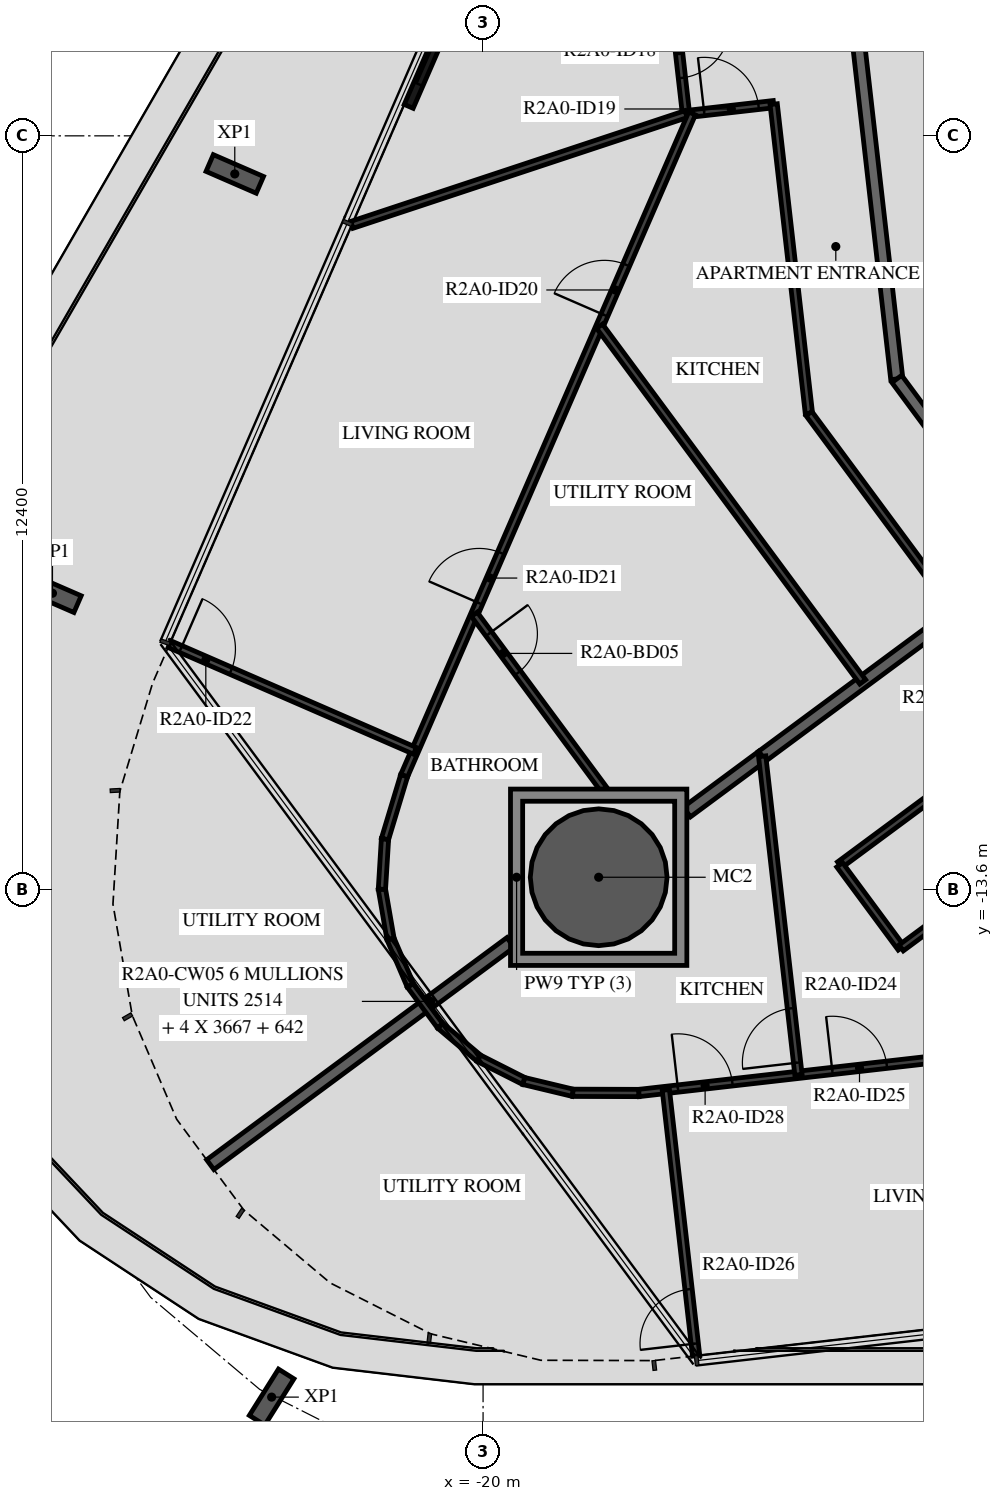
"""IFC4 building model, lengths in metres.
Left out: names, types, materials, properties, quantities, classifications, styles, units other than length and angle.
Written with IfcOpenShell. Run it as: python <this file> out.ifc"""

import sys

from ifc_helpers import new_model, si_unit, direction, frame, frame_2d, origin, origin_2d, place, context, subcontext, project, spatial, polyline, rectangle, hollow_circle, i_section, outline, extrude, element, fill, save


model = new_model("IFC4")
c1 = context("Model", 3, precision=1e-05, world=origin(), true_north=direction((0.0, 1.0)))
c2 = subcontext(c1, "Body", "Model", "MODEL_VIEW")
j1 = project(units=[si_unit("LENGTHUNIT", "METRE"), si_unit("PLANEANGLEUNIT", "RADIAN")], contexts=[c1])
p1 = place(None, origin())
s1 = spatial("IfcSite", under=j1, at=p1, CompositionType="ELEMENT")
p2 = place(p1, origin())
s2 = spatial("IfcBuilding", under=s1, at=p2, CompositionType="ELEMENT")
p3 = place(p2, frame((0.0, 0.0, 76.7)))
s3 = spatial("IfcBuildingStorey", under=s2, at=p3, CompositionType="ELEMENT", Elevation=76.7)
p4 = place(p3, frame((-18.099, -13.393, -0.45), z_axis=(0.0, 0.0, 1.0), x_axis=(1.0, 0.0, 0.0)))
e1 = element("IfcColumn", 1, at=p4, inside=s3, PredefinedType="COLUMN", context=c2, shape_type="SweptSolid", body=[
    extrude(hollow_circle(Radius=1.125, WallThickness=0.055, at=origin_2d()), origin(), (0.0, 0.0, 1.0), 3.57),
])
for number, where, z_axis, x_axis in (
    (2, (-24.083, -1.826, -0.45), (0.0, 0.0, 1.0), (0.399, 0.917, 0.0)),
    (3, (-27.081, -8.722, -0.45), (0.0, 0.0, 1.0), (0.399, 0.917, 0.0)),
    (4, (-23.477, -21.941, -0.45), (0.0, 0.0, 1.0), (-0.846, 0.532, 0.0)),
):
    element("IfcColumn", number, at=place(p3, frame(where, z_axis=z_axis, x_axis=x_axis)), inside=s3, PredefinedType="COLUMN", context=c2, shape_type="SweptSolid", body=[
        extrude(i_section(OverallWidth=0.3, OverallDepth=0.9, WebThickness=0.019, FlangeThickness=0.035, FilletRadius=0.03, at=origin_2d()), origin(), (0.0, 0.0, 1.0), 3.57),
    ])
p5 = place(p3, frame((-19.947, 2.219, 0.0), z_axis=(0.0, 0.0, 1.0), x_axis=(-0.398784695066, -0.917044582876, 0.0)))
e5 = element("IfcWall", 5, at=p5, inside=s3, PredefinedType="STANDARD", context=c2, shape_type="SweptSolid", body=[
    extrude(rectangle(XDim=3.2, YDim=0.16, at=frame_2d((1.6, 0.0))), origin(), (0.0, 0.0, 1.0), 3.12),
])
p6 = place(p5, frame((0.4, 0.0, 0.0)))
e6 = element("IfcOpeningElement", 6, at=p6, cuts=e5, PredefinedType="OPENING", context=c2, shape_type="SweptSolid", body=[
    extrude(rectangle(XDim=2.4, YDim=2.4, at=frame_2d((1.2, 1.2))), frame((0.0, 0.09, 0.0), z_axis=(0.0, -1.0, 0.0), x_axis=(1.0, 0.0, 0.0)), (0.0, 0.0, 1.0), 0.18),
])
p7 = place(p3, frame((-14.013, 1.974, 0.0), z_axis=(0.0, 0.0, 1.0), x_axis=(0.113196526349, -0.993572617589, 0.0)))
e7 = element("IfcWall", 7, at=p7, inside=s3, PredefinedType="STANDARD", context=c2, shape_type="SweptSolid", body=[
    extrude(rectangle(XDim=7.219, YDim=0.2, at=frame_2d((3.609, 0.0))), origin(), (0.0, 0.0, 1.0), 3.12),
])
p8 = place(p7, frame((0.2, 0.0, 0.0)))
e8 = element("IfcOpeningElement", 8, at=p8, cuts=e7, PredefinedType="OPENING", context=c2, shape_type="SweptSolid", body=[
    extrude(rectangle(XDim=1.0, YDim=2.1, at=frame_2d((0.5, 1.05))), frame((0.0, 0.11, 0.0), z_axis=(0.0, -1.0, 0.0), x_axis=(1.0, 0.0, 0.0)), (0.0, 0.0, 1.0), 0.22),
])
p9 = place(p3, frame((-13.196, -5.198, 0.0), z_axis=(0.0, 0.0, 1.0), x_axis=(0.594805187394, -0.803869883159, 0.0)))
e9 = element("IfcWall", 9, at=p9, inside=s3, PredefinedType="STANDARD", context=c2, shape_type="SweptSolid", body=[
    extrude(rectangle(XDim=7.342, YDim=0.2, at=frame_2d((3.671, 0.0))), origin(), (0.0, 0.0, 1.0), 3.12),
])
p10 = place(p3, frame((-15.41, -11.403, 0.0), z_axis=(0.0, 0.0, 1.0), x_axis=(0.803887568227, 0.594781285558, 0.0)))
e10 = element("IfcWall", 10, at=p10, inside=s3, PredefinedType="STANDARD", context=c2, shape_type="SweptSolid", body=[
    extrude(rectangle(XDim=5.47, YDim=0.2, at=frame_2d((2.735, 0.0))), origin(), (0.0, 0.0, 1.0), 3.12),
])
p11 = place(p3, frame((-16.649, -12.32, 0.0), z_axis=(0.0, 0.0, 1.0), x_axis=(0.803804030903, 0.594894175383, 0.0)))
e11 = element("IfcWall", 11, at=p11, inside=s3, PredefinedType="STANDARD", context=c2, shape_type="SweptSolid", body=[
    extrude(rectangle(XDim=1.542, YDim=0.2, at=frame_2d((0.771, 0.0))), origin(), (0.0, 0.0, 1.0), 3.12),
])
p12 = place(p3, frame((-24.486, -18.119, 0.0), z_axis=(0.0, 0.0, 1.0), x_axis=(0.80384227933, 0.594842491726, 0.0)))
e12 = element("IfcWall", 12, at=p12, inside=s3, PredefinedType="STANDARD", context=c2, shape_type="SweptSolid", body=[
    extrude(rectangle(XDim=6.142, YDim=0.2, at=frame_2d((3.071, 0.0))), origin(), (0.0, 0.0, 1.0), 3.12),
])
p13 = place(p3, frame((-16.854, 0.846, 0.0), z_axis=(0.0, 0.0, 1.0), x_axis=(0.113173930474, -0.993575191649, 0.0)))
e13 = element("IfcWall", 13, at=p13, inside=s3, PredefinedType="PARTITIONING", context=c2, shape_type="SweptSolid", body=[
    extrude(rectangle(XDim=1.7, YDim=0.12, at=frame_2d((0.85, 0.0))), origin(), (0.0, 0.0, 1.0), 3.12),
])
p14 = place(p13, frame((0.2, 0.0, 0.0)))
e14 = element("IfcOpeningElement", 14, at=p14, cuts=e13, PredefinedType="OPENING", context=c2, shape_type="SweptSolid", body=[
    extrude(rectangle(XDim=0.9, YDim=2.1, at=frame_2d((0.45, 1.05))), frame((0.0, 0.07, 0.0), z_axis=(0.0, -1.0, 0.0), x_axis=(1.0, 0.0, 0.0)), (0.0, 0.0, 1.0), 0.14),
])
p15 = place(p3, frame((-16.563, -0.832, 0.0), z_axis=(0.0, 0.0, 1.0), x_axis=(0.993578035261, 0.113148963084, 0.0)))
e15 = element("IfcWall", 15, at=p15, inside=s3, PredefinedType="PARTITIONING", context=c2, shape_type="SweptSolid", body=[
    extrude(rectangle(XDim=1.351, YDim=0.12, at=frame_2d((0.675, 0.0))), origin(), (0.0, 0.0, 1.0), 3.12),
])
p16 = place(p15, frame((0.2, 0.0, 0.0)))
e16 = element("IfcOpeningElement", 16, at=p16, cuts=e15, PredefinedType="OPENING", context=c2, shape_type="SweptSolid", body=[
    extrude(rectangle(XDim=0.9, YDim=2.1, at=frame_2d((0.45, 1.05))), frame((0.0, 0.07, 0.0), z_axis=(0.0, -1.0, 0.0), x_axis=(1.0, 0.0, 0.0)), (0.0, 0.0, 1.0), 0.14),
])
p17 = place(p3, frame((-15.221, -0.679, 0.0), z_axis=(0.0, 0.0, 1.0), x_axis=(0.113219875647, -0.993569957154, 0.0)))
e17 = element("IfcWall", 17, at=p17, inside=s3, PredefinedType="PARTITIONING", context=c2, shape_type="SweptSolid", body=[
    extrude(rectangle(XDim=5.121, YDim=0.12, at=frame_2d((2.561, 0.0))), origin(), (0.0, 0.0, 1.0), 3.12),
])
p18 = place(p3, frame((-14.641, -5.767, 0.0), z_axis=(0.0, 0.0, 1.0), x_axis=(0.594825885962, -0.803854567313, 0.0)))
e18 = element("IfcWall", 18, at=p18, inside=s3, PredefinedType="PARTITIONING", context=c2, shape_type="SweptSolid", body=[
    extrude(rectangle(XDim=6.266, YDim=0.12, at=frame_2d((3.133, 0.0))), origin(), (0.0, 0.0, 1.0), 3.12),
])
p19 = place(p18, frame((4.273, 0.0, 0.0)))
e19 = element("IfcOpeningElement", 19, at=p19, cuts=e18, PredefinedType="OPENING", context=c2, shape_type="SweptSolid", body=[
    extrude(rectangle(XDim=0.9, YDim=2.1, at=frame_2d((0.45, 1.05))), frame((0.0, 0.07, 0.0), z_axis=(0.0, -1.0, 0.0), x_axis=(1.0, 0.0, 0.0)), (0.0, 0.0, 1.0), 0.14),
])
p20 = place(p3, frame((-22.157, -2.664, 0.0), z_axis=(0.0, 0.0, 1.0), x_axis=(0.949263673698, 0.314481283698, 0.0)))
e20 = element("IfcWall", 20, at=p20, inside=s3, PredefinedType="PARTITIONING", context=c2, shape_type="SweptSolid", body=[
    extrude(rectangle(XDim=5.789, YDim=0.12, at=frame_2d((2.895, 0.0))), origin(), (0.0, 0.0, 1.0), 3.12),
])
p21 = place(p3, frame((-21.298, -11.722, 0.0), z_axis=(0.0, 0.0, 1.0), x_axis=(0.398737387658, 0.917065153456, 0.0)))
e21 = element("IfcWall", 21, at=p21, inside=s3, PredefinedType="PARTITIONING", context=c2, shape_type="SweptSolid", body=[
    extrude(rectangle(XDim=11.875, YDim=0.12, at=frame_2d((5.938, 0.0))), origin(), (0.0, 0.0, 1.0), 3.12),
])
p22 = place(p21, frame((8.26, 0.0, 0.0)))
e22 = element("IfcOpeningElement", 22, at=p22, cuts=e21, PredefinedType="OPENING", context=c2, shape_type="SweptSolid", body=[
    extrude(rectangle(XDim=0.9, YDim=2.1, at=frame_2d((0.45, 1.05))), frame((0.0, 0.07, 0.0), z_axis=(0.0, -1.0, 0.0), x_axis=(1.0, 0.0, 0.0)), (0.0, 0.0, 1.0), 0.14),
])
p23 = place(p21, frame((3.094, 0.0, 0.0)))
e23 = element("IfcOpeningElement", 23, at=p23, cuts=e21, PredefinedType="OPENING", context=c2, shape_type="SweptSolid", body=[
    extrude(rectangle(XDim=0.9, YDim=2.1, at=frame_2d((0.45, 1.05))), frame((0.0, 0.07, 0.0), z_axis=(0.0, -1.0, 0.0), x_axis=(1.0, 0.0, 0.0)), (0.0, 0.0, 1.0), 0.14),
])
p24 = place(p3, frame((-25.156, -9.559, 0.0), z_axis=(0.0, 0.0, 1.0), x_axis=(0.917042707292, -0.398789008127, 0.0)))
e24 = element("IfcWall", 24, at=p24, inside=s3, PredefinedType="PARTITIONING", context=c2, shape_type="SweptSolid", body=[
    extrude(rectangle(XDim=4.4, YDim=0.12, at=frame_2d((2.2, 0.0))), origin(), (0.0, 0.0, 1.0), 2.73),
])
p25 = place(p24, frame((0.2, 0.0, 0.0)))
e25 = element("IfcOpeningElement", 25, at=p25, cuts=e24, PredefinedType="OPENING", context=c2, shape_type="SweptSolid", body=[
    extrude(rectangle(XDim=0.9, YDim=2.1, at=frame_2d((0.45, 1.05))), frame((0.0, 0.07, 0.0), z_axis=(0.0, -1.0, 0.0), x_axis=(1.0, 0.0, 0.0)), (0.0, 0.0, 1.0), 0.14),
])
p26 = place(p3, frame((-18.084, -4.331, 0.0), z_axis=(0.0, 0.0, 1.0), x_axis=(0.594811782108, -0.803865003508, 0.0)))
e26 = element("IfcWall", 26, at=p26, inside=s3, PredefinedType="PARTITIONING", context=c2, shape_type="SweptSolid", body=[
    extrude(rectangle(XDim=7.276, YDim=0.12, at=frame_2d((3.638, 0.0))), origin(), (0.0, 0.0, 1.0), 3.12),
])
p27 = place(p3, frame((-20.144, -9.068, 0.0), z_axis=(0.0, 0.0, 1.0), x_axis=(0.59487477233, -0.803818390711, 0.0)))
e27 = element("IfcWall", 27, at=p27, inside=s3, PredefinedType="PARTITIONING", context=c2, shape_type="SweptSolid", body=[
    extrude(rectangle(XDim=3.575, YDim=0.12, at=frame_2d((1.788, 0.0))), origin(), (0.0, 0.0, 1.0), 3.12),
])
p28 = place(p27, frame((0.4, 0.0, 0.0)))
e28 = element("IfcOpeningElement", 28, at=p28, cuts=e27, PredefinedType="OPENING", context=c2, shape_type="SweptSolid", body=[
    extrude(rectangle(XDim=0.8, YDim=2.1, at=frame_2d((0.4, 1.05))), frame((0.0, 0.07, 0.0), z_axis=(0.0, -1.0, 0.0), x_axis=(1.0, 0.0, 0.0)), (0.0, 0.0, 1.0), 0.14),
])
for number, where, z_axis, x_axis in (
    (29, (-20.703, -15.835, 0.0), (0.0, 0.0, 1.0), (-0.595, 0.804, 0.0)),
    (30, (-21.196, -15.168, 0.0), (0.0, 0.0, 1.0), (-0.394, 0.919, 0.0)),
):
    element("IfcWall", number, at=place(p3, frame(where, z_axis=z_axis, x_axis=x_axis)), inside=s3, PredefinedType="PARTITIONING", context=c2, shape_type="SweptSolid", body=[
        extrude(rectangle(XDim=0.829, YDim=0.12, at=frame_2d((0.415, 0.0))), origin(), (0.0, 0.0, 1.0), 3.12),
    ])
p29 = place(p3, frame((-21.522, -14.406, 0.0), z_axis=(0.0, 0.0, 1.0), x_axis=(-0.170794347099, 0.985306698952, 0.0)))
e31 = element("IfcWall", 31, at=p29, inside=s3, PredefinedType="PARTITIONING", context=c2, shape_type="SweptSolid", body=[
    extrude(rectangle(XDim=0.829, YDim=0.12, at=frame_2d((0.415, 0.0))), origin(), (0.0, 0.0, 1.0), 3.12),
])
p30 = place(p3, frame((-21.664, -13.59, 0.0), z_axis=(0.0, 0.0, 1.0), x_axis=(0.061277779288, 0.998120751095, 0.0)))
e32 = element("IfcWall", 32, at=p30, inside=s3, PredefinedType="PARTITIONING", context=c2, shape_type="SweptSolid", body=[
    extrude(rectangle(XDim=0.829, YDim=0.12, at=frame_2d((0.414, 0.0))), origin(), (0.0, 0.0, 1.0), 3.12),
])
p31 = place(p3, frame((-21.613, -12.762, 0.0), z_axis=(0.0, 0.0, 1.0), x_axis=(0.289552239308, 0.95716221233, 0.0)))
e33 = element("IfcWall", 33, at=p31, inside=s3, PredefinedType="PARTITIONING", context=c2, shape_type="SweptSolid", body=[
    extrude(rectangle(XDim=1.087, YDim=0.12, at=frame_2d((0.543, 0.0))), origin(), (0.0, 0.0, 1.0), 3.12),
])
p32 = place(p3, frame((-10.914, -10.804, 0.0), z_axis=(0.0, 0.0, 1.0), x_axis=(-0.803864616889, -0.594812304609, 0.0)))
e34 = element("IfcWall", 34, at=p32, inside=s3, PredefinedType="PARTITIONING", context=c2, shape_type="SweptSolid", body=[
    extrude(rectangle(XDim=4.008, YDim=0.12, at=frame_2d((2.004, 0.0))), origin(), (0.0, 0.0, 1.0), 3.12),
])
p33 = place(p3, frame((-14.136, -13.188, 0.0), z_axis=(0.0, 0.0, 1.0), x_axis=(0.594863421241, -0.803826791087, 0.0)))
e35 = element("IfcWall", 35, at=p33, inside=s3, PredefinedType="PARTITIONING", context=c2, shape_type="SweptSolid", body=[
    extrude(rectangle(XDim=1.7, YDim=0.12, at=frame_2d((0.85, 0.0))), origin(), (0.0, 0.0, 1.0), 3.12),
])
p34 = place(p3, frame((-13.125, -14.555, 0.0), z_axis=(0.0, 0.0, 1.0), x_axis=(0.80389374229, 0.594772940799, 0.0)))
e36 = element("IfcWall", 36, at=p34, inside=s3, PredefinedType="PARTITIONING", context=c2, shape_type="SweptSolid", body=[
    extrude(rectangle(XDim=4.008, YDim=0.12, at=frame_2d((2.004, 0.0))), origin(), (0.0, 0.0, 1.0), 3.12),
])
for number, where, z_axis, x_axis in (
    (37, (-20.703, -15.835, 0.0), (0.0, 0.0, 1.0), (0.764, -0.645, 0.0)),
    (38, (-20.069, -16.369, 0.0), (0.0, 0.0, 1.0), (0.892, -0.451, 0.0)),
):
    element("IfcWall", number, at=place(p3, frame(where, z_axis=z_axis, x_axis=x_axis)), inside=s3, PredefinedType="PARTITIONING", context=c2, shape_type="SweptSolid", body=[
        extrude(rectangle(XDim=0.829, YDim=0.12, at=frame_2d((0.415, 0.0))), origin(), (0.0, 0.0, 1.0), 3.12),
    ])
p35 = place(p3, frame((-19.33, -16.744, 0.0), z_axis=(0.0, 0.0, 1.0), x_axis=(0.972403343288, -0.23330610357, 0.0)))
e39 = element("IfcWall", 39, at=p35, inside=s3, PredefinedType="PARTITIONING", context=c2, shape_type="SweptSolid", body=[
    extrude(rectangle(XDim=0.829, YDim=0.12, at=frame_2d((0.415, 0.0))), origin(), (0.0, 0.0, 1.0), 3.12),
])
p36 = place(p3, frame((-18.524, -16.937, 0.0), z_axis=(0.0, 0.0, 1.0), x_axis=(0.999995736722, -0.00292002349, 0.0)))
e40 = element("IfcWall", 40, at=p36, inside=s3, PredefinedType="PARTITIONING", context=c2, shape_type="SweptSolid", body=[
    extrude(rectangle(XDim=1.087, YDim=0.12, at=frame_2d((0.543, 0.0))), origin(), (0.0, 0.0, 1.0), 3.12),
])
p37 = place(p3, frame((-17.437, -16.94, 0.0), z_axis=(0.0, 0.0, 1.0), x_axis=(0.993573314119, 0.113190412448, 0.0)))
e41 = element("IfcWall", 41, at=p37, inside=s3, PredefinedType="PARTITIONING", context=c2, shape_type="SweptSolid", body=[
    extrude(rectangle(XDim=14.576, YDim=0.12, at=frame_2d((7.288, 0.0))), origin(), (0.0, 0.0, 1.0), 3.12),
])
p38 = place(p37, frame((3.201, 0.0, 0.0)))
e42 = element("IfcOpeningElement", 42, at=p38, cuts=e41, PredefinedType="OPENING", context=c2, shape_type="SweptSolid", body=[
    extrude(rectangle(XDim=0.9, YDim=2.1, at=frame_2d((0.45, 1.05))), frame((0.0, 0.07, 0.0), z_axis=(0.0, -1.0, 0.0), x_axis=(1.0, 0.0, 0.0)), (0.0, 0.0, 1.0), 0.14),
])
p39 = place(p37, frame((0.645, 0.0, 0.0)))
e43 = element("IfcOpeningElement", 43, at=p39, cuts=e41, PredefinedType="OPENING", context=c2, shape_type="SweptSolid", body=[
    extrude(rectangle(XDim=0.9, YDim=2.1, at=frame_2d((0.45, 1.05))), frame((0.0, 0.07, 0.0), z_axis=(0.0, -1.0, 0.0), x_axis=(1.0, 0.0, 0.0)), (0.0, 0.0, 1.0), 0.14),
])
p40 = place(p3, frame((-14.813, -16.641, 0.0), z_axis=(0.0, 0.0, 1.0), x_axis=(-0.113210971478, 0.993570971767, 0.0)))
e44 = element("IfcWall", 44, at=p40, inside=s3, PredefinedType="PARTITIONING", context=c2, shape_type="SweptSolid", body=[
    extrude(rectangle(XDim=5.273, YDim=0.12, at=frame_2d((2.636, 0.0))), origin(), (0.0, 0.0, 1.0), 3.12),
])
p41 = place(p40, frame((0.2, 0.0, 0.0)))
e45 = element("IfcOpeningElement", 45, at=p41, cuts=e44, PredefinedType="OPENING", context=c2, shape_type="SweptSolid", body=[
    extrude(rectangle(XDim=0.9, YDim=2.1, at=frame_2d((0.45, 1.05))), frame((0.0, 0.07, 0.0), z_axis=(0.0, -1.0, 0.0), x_axis=(1.0, 0.0, 0.0)), (0.0, 0.0, 1.0), 0.14),
])
p42 = place(p3, frame((-16.496, -21.262, 0.0), z_axis=(0.0, 0.0, 1.0), x_axis=(-0.1132445713, 0.993567142709, 0.0)))
e46 = element("IfcWall", 46, at=p42, inside=s3, PredefinedType="PARTITIONING", context=c2, shape_type="SweptSolid", body=[
    extrude(rectangle(XDim=4.4, YDim=0.12, at=frame_2d((2.2, 0.0))), origin(), (0.0, 0.0, 1.0), 2.73),
])
p43 = place(p42, frame((0.2, 0.0, 0.0)))
e47 = element("IfcOpeningElement", 47, at=p43, cuts=e46, PredefinedType="OPENING", context=c2, shape_type="SweptSolid", body=[
    extrude(rectangle(XDim=0.9, YDim=2.1, at=frame_2d((0.45, 1.05))), frame((0.0, 0.07, 0.0), z_axis=(0.0, -1.0, 0.0), x_axis=(1.0, 0.0, 0.0)), (0.0, 0.0, 1.0), 0.14),
])
p44 = place(p3, origin())
e48 = element("IfcWall", 48, at=p44, inside=s3, PredefinedType="STANDARD", context=c2, shape_type="SweptSolid", body=[
    extrude(outline(polyline([(-16.649, -11.942), (-16.649, -14.843), (-19.549, -14.843), (-19.549, -11.942), (-16.649, -11.942)]), holes=[polyline([(-19.349, -14.643), (-16.849, -14.643), (-16.849, -12.143), (-19.349, -12.143), (-19.349, -14.643)])]), origin(), (0.0, 0.0, 1.0), 3.12),
])
p45 = place(p6, origin())
e49 = element("IfcDoor", 49, at=p45, inside=s3, OperationType="DOUBLE_DOOR_SLIDING", PredefinedType="DOOR", context=c2, shape_type="SweptSolid", body=[
    extrude(rectangle(XDim=2.4, YDim=2.4, at=frame_2d((1.2, 1.2))), frame((0.0, 0.025, 0.0), z_axis=(0.0, -1.0, 0.0), x_axis=(1.0, 0.0, 0.0)), (0.0, 0.0, 1.0), 0.05),
])
fill(e6, e49)
p46 = place(p14, origin())
e50 = element("IfcDoor", 50, at=p46, inside=s3, OperationType="SINGLE_SWING_RIGHT", PredefinedType="DOOR", context=c2, shape_type="SweptSolid", body=[
    extrude(rectangle(XDim=0.9, YDim=2.1, at=frame_2d((0.45, 1.05))), frame((0.0, 0.025, 0.0), z_axis=(0.0, -1.0, 0.0), x_axis=(1.0, 0.0, 0.0)), (0.0, 0.0, 1.0), 0.05),
])
fill(e14, e50)
p47 = place(p16, origin())
e51 = element("IfcDoor", 51, at=p47, inside=s3, OperationType="SINGLE_SWING_LEFT", PredefinedType="DOOR", context=c2, shape_type="SweptSolid", body=[
    extrude(rectangle(XDim=0.9, YDim=2.1, at=frame_2d((0.45, 1.05))), frame((0.0, 0.025, 0.0), z_axis=(0.0, -1.0, 0.0), x_axis=(1.0, 0.0, 0.0)), (0.0, 0.0, 1.0), 0.05),
])
fill(e16, e51)
p48 = place(p22, origin())
e52 = element("IfcDoor", 52, at=p48, inside=s3, OperationType="SINGLE_SWING_RIGHT", PredefinedType="DOOR", context=c2, shape_type="SweptSolid", body=[
    extrude(rectangle(XDim=0.9, YDim=2.1, at=frame_2d((0.45, 1.05))), frame((0.0, 0.025, 0.0), z_axis=(0.0, -1.0, 0.0), x_axis=(1.0, 0.0, 0.0)), (0.0, 0.0, 1.0), 0.05),
])
fill(e22, e52)
p49 = place(p23, origin())
e53 = element("IfcDoor", 53, at=p49, inside=s3, OperationType="SINGLE_SWING_LEFT", PredefinedType="DOOR", context=c2, shape_type="SweptSolid", body=[
    extrude(rectangle(XDim=0.9, YDim=2.1, at=frame_2d((0.45, 1.05))), frame((0.0, 0.025, 0.0), z_axis=(0.0, -1.0, 0.0), x_axis=(1.0, 0.0, 0.0)), (0.0, 0.0, 1.0), 0.05),
])
fill(e23, e53)
p50 = place(p28, origin())
e54 = element("IfcDoor", 54, at=p50, inside=s3, OperationType="SINGLE_SWING_RIGHT", PredefinedType="DOOR", context=c2, shape_type="SweptSolid", body=[
    extrude(rectangle(XDim=0.8, YDim=2.1, at=frame_2d((0.4, 1.05))), frame((0.0, 0.025, 0.0), z_axis=(0.0, -1.0, 0.0), x_axis=(1.0, 0.0, 0.0)), (0.0, 0.0, 1.0), 0.05),
])
fill(e28, e54)
p51 = place(p25, origin())
e55 = element("IfcDoor", 55, at=p51, inside=s3, OperationType="SINGLE_SWING_RIGHT", PredefinedType="DOOR", context=c2, shape_type="SweptSolid", body=[
    extrude(rectangle(XDim=0.9, YDim=2.1, at=frame_2d((0.45, 1.05))), frame((0.0, 0.025, 0.0), z_axis=(0.0, -1.0, 0.0), x_axis=(1.0, 0.0, 0.0)), (0.0, 0.0, 1.0), 0.05),
])
fill(e25, e55)
p52 = place(p41, origin())
e56 = element("IfcDoor", 56, at=p52, inside=s3, OperationType="SINGLE_SWING_LEFT", PredefinedType="DOOR", context=c2, shape_type="SweptSolid", body=[
    extrude(rectangle(XDim=0.9, YDim=2.1, at=frame_2d((0.45, 1.05))), frame((0.0, 0.025, 0.0), z_axis=(0.0, -1.0, 0.0), x_axis=(1.0, 0.0, 0.0)), (0.0, 0.0, 1.0), 0.05),
])
fill(e45, e56)
p53 = place(p38, origin())
e57 = element("IfcDoor", 57, at=p53, inside=s3, OperationType="SINGLE_SWING_LEFT", PredefinedType="DOOR", context=c2, shape_type="SweptSolid", body=[
    extrude(rectangle(XDim=0.9, YDim=2.1, at=frame_2d((0.45, 1.05))), frame((0.0, 0.025, 0.0), z_axis=(0.0, -1.0, 0.0), x_axis=(1.0, 0.0, 0.0)), (0.0, 0.0, 1.0), 0.05),
])
fill(e42, e57)
p54 = place(p43, origin())
e58 = element("IfcDoor", 58, at=p54, inside=s3, OperationType="SINGLE_SWING_LEFT", PredefinedType="DOOR", context=c2, shape_type="SweptSolid", body=[
    extrude(rectangle(XDim=0.9, YDim=2.1, at=frame_2d((0.45, 1.05))), frame((0.0, 0.025, 0.0), z_axis=(0.0, -1.0, 0.0), x_axis=(1.0, 0.0, 0.0)), (0.0, 0.0, 1.0), 0.05),
])
fill(e47, e58)
p55 = place(p39, origin())
e59 = element("IfcDoor", 59, at=p55, inside=s3, OperationType="SINGLE_SWING_RIGHT", PredefinedType="DOOR", context=c2, shape_type="SweptSolid", body=[
    extrude(rectangle(XDim=0.9, YDim=2.1, at=frame_2d((0.45, 1.05))), frame((0.0, 0.025, 0.0), z_axis=(0.0, -1.0, 0.0), x_axis=(1.0, 0.0, 0.0)), (0.0, 0.0, 1.0), 0.05),
])
fill(e43, e59)
save(model, sys.argv[1])
